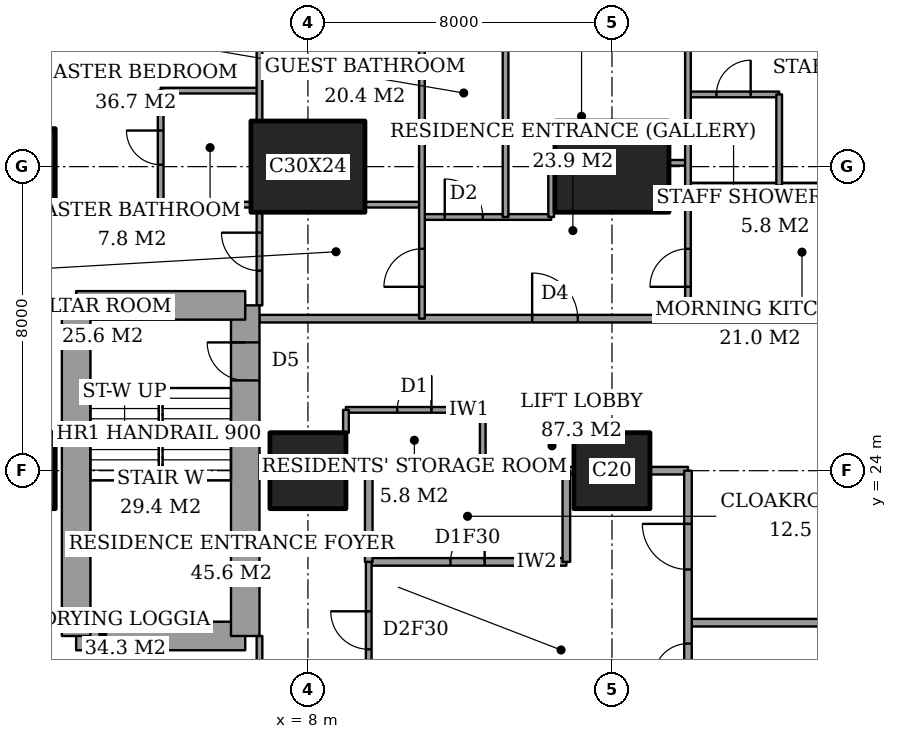
"""IFC4 building model, lengths in metres.
Left out: names, types, materials, properties, quantities, classifications, styles, units other than length and angle.
Written with IfcOpenShell. Run it as: python <this file> out.ifc"""

import sys

from ifc_helpers import new_model, si_unit, direction, frame, frame_2d, origin, origin_2d, place, context, subcontext, project, spatial, rectangle, extrude, element, fill, save


model = new_model("IFC4")
c1 = context("Model", 3, precision=1e-05, world=origin(), true_north=direction((0.0, 1.0)))
c2 = subcontext(c1, "Body", "Model", "MODEL_VIEW")
j1 = project(units=[si_unit("LENGTHUNIT", "METRE"), si_unit("PLANEANGLEUNIT", "RADIAN")], contexts=[c1])
p1 = place(None, origin())
s1 = spatial("IfcSite", under=j1, at=p1, CompositionType="ELEMENT")
p2 = place(p1, origin())
s2 = spatial("IfcBuilding", under=s1, at=p2, CompositionType="ELEMENT")
p3 = place(p2, frame((0.0, 0.0, 110.6)))
s3 = spatial("IfcBuildingStorey", under=s2, at=p3, CompositionType="ELEMENT", Elevation=110.6)
for number, where, z_axis, x_axis in (
    (1, (0.35, 24.0, 0.0), (0.0, 0.0, 1.0), (1.0, 0.0, 0.0)),
    (2, (0.35, 32.0, 0.0), (0.0, 0.0, 1.0), (1.0, 0.0, 0.0)),
    (3, (8.0, 24.0, 0.0), (0.0, 0.0, 1.0), (1.0, 0.0, 0.0)),
):
    element("IfcColumn", number, at=place(p3, frame(where, z_axis=z_axis, x_axis=x_axis)), inside=s3, PredefinedType="COLUMN", context=c2, shape_type="SweptSolid", body=[
        extrude(rectangle(XDim=2.0, YDim=2.0, at=origin_2d()), origin(), (0.0, 0.0, 1.0), 3.6),
    ])
p4 = place(p3, frame((8.0, 32.0, 0.0), z_axis=(0.0, 0.0, 1.0), x_axis=(1.0, 0.0, 0.0)))
e4 = element("IfcColumn", 4, at=p4, inside=s3, PredefinedType="COLUMN", context=c2, shape_type="SweptSolid", body=[
    extrude(rectangle(XDim=3.0, YDim=2.4, at=origin_2d()), origin(), (0.0, 0.0, 1.0), 3.6),
])
p5 = place(p3, frame((16.0, 24.0, 0.0), z_axis=(0.0, 0.0, 1.0), x_axis=(1.0, 0.0, 0.0)))
e5 = element("IfcColumn", 5, at=p5, inside=s3, PredefinedType="COLUMN", context=c2, shape_type="SweptSolid", body=[
    extrude(rectangle(XDim=2.0, YDim=2.0, at=origin_2d()), origin(), (0.0, 0.0, 1.0), 3.6),
])
p6 = place(p3, frame((16.0, 32.0, 0.0), z_axis=(0.0, 0.0, 1.0), x_axis=(1.0, 0.0, 0.0)))
e6 = element("IfcColumn", 6, at=p6, inside=s3, PredefinedType="COLUMN", context=c2, shape_type="SweptSolid", body=[
    extrude(rectangle(XDim=3.0, YDim=2.4, at=origin_2d()), origin(), (0.0, 0.0, 1.0), 3.6),
])
p7 = place(p3, frame((1.9, 19.65, 0.0), z_axis=(0.0, 0.0, 1.0), x_axis=(1.0, 0.0, 0.0)))
e7 = element("IfcWall", 7, at=p7, inside=s3, PredefinedType="SHEAR", context=c2, shape_type="SweptSolid", body=[
    extrude(rectangle(XDim=4.45, YDim=0.75, at=frame_2d((2.225, 0.0))), origin(), (0.0, 0.0, 1.0), 3.6),
])
p8 = place(p3, frame((6.35, 19.65, 0.0), z_axis=(0.0, 0.0, 1.0), x_axis=(0.0, 1.0, 0.0)))
e8 = element("IfcWall", 8, at=p8, inside=s3, PredefinedType="SHEAR", context=c2, shape_type="SweptSolid", body=[
    extrude(rectangle(XDim=8.7, YDim=0.75, at=frame_2d((4.35, 0.0))), origin(), (0.0, 0.0, 1.0), 3.6),
])
p9 = place(p8, frame((6.725, 0.0, 0.0)))
e9 = element("IfcOpeningElement", 9, at=p9, cuts=e8, PredefinedType="OPENING", context=c2, shape_type="SweptSolid", body=[
    extrude(rectangle(XDim=1.0, YDim=2.1, at=frame_2d((0.5, 1.05))), frame((0.0, 0.385, 0.0), z_axis=(0.0, -1.0, 0.0), x_axis=(1.0, 0.0, 0.0)), (0.0, 0.0, 1.0), 0.77),
])
p10 = place(p3, frame((6.35, 28.35, 0.0), z_axis=(0.0, 0.0, 1.0), x_axis=(-1.0, 0.0, 0.0)))
e10 = element("IfcWall", 10, at=p10, inside=s3, PredefinedType="SHEAR", context=c2, shape_type="SweptSolid", body=[
    extrude(rectangle(XDim=4.45, YDim=0.75, at=frame_2d((2.225, 0.0))), origin(), (0.0, 0.0, 1.0), 3.6),
])
p11 = place(p3, frame((1.9, 28.35, 0.0), z_axis=(0.0, 0.0, 1.0), x_axis=(0.0, -1.0, 0.0)))
e11 = element("IfcWall", 11, at=p11, inside=s3, PredefinedType="SHEAR", context=c2, shape_type="SweptSolid", body=[
    extrude(rectangle(XDim=8.7, YDim=0.75, at=frame_2d((4.35, 0.0))), origin(), (0.0, 0.0, 1.0), 3.6),
])
p12 = place(p3, frame((18.0, 20.0, 0.0), z_axis=(0.0, 0.0, 1.0), x_axis=(1.0, 0.0, 0.0)))
e12 = element("IfcWall", 12, at=p12, inside=s3, PredefinedType="PARTITIONING", context=c2, shape_type="SweptSolid", body=[
    extrude(rectangle(XDim=6.0, YDim=0.2, at=frame_2d((3.0, 0.0))), origin(), (0.0, 0.0, 1.0), 3.35),
])
p13 = place(p3, frame((9.6, 21.6, 0.0), z_axis=(0.0, 0.0, 1.0), x_axis=(1.0, 0.0, 0.0)))
e13 = element("IfcWall", 13, at=p13, inside=s3, PredefinedType="PARTITIONING", context=c2, shape_type="SweptSolid", body=[
    extrude(rectangle(XDim=5.2, YDim=0.2, at=frame_2d((2.6, 0.0))), origin(), (0.0, 0.0, 1.0), 3.35),
])
p14 = place(p13, frame((2.15, 0.0, 0.0)))
e14 = element("IfcOpeningElement", 14, at=p14, cuts=e13, PredefinedType="OPENING", context=c2, shape_type="SweptSolid", body=[
    extrude(rectangle(XDim=0.9, YDim=2.1, at=frame_2d((0.45, 1.05))), frame((0.0, 0.11, 0.0), z_axis=(0.0, -1.0, 0.0), x_axis=(1.0, 0.0, 0.0)), (0.0, 0.0, 1.0), 0.22),
])
p15 = place(p3, frame((9.0, 24.0, 0.0), z_axis=(0.0, 0.0, 1.0), x_axis=(1.0, 0.0, 0.0)))
e15 = element("IfcWall", 15, at=p15, inside=s3, PredefinedType="PARTITIONING", context=c2, shape_type="SweptSolid", body=[
    extrude(rectangle(XDim=6.0, YDim=0.2, at=frame_2d((3.0, 0.0))), origin(), (0.0, 0.0, 1.0), 3.35),
])
p16 = place(p3, frame((17.0, 24.0, 0.0), z_axis=(0.0, 0.0, 1.0), x_axis=(1.0, 0.0, 0.0)))
e16 = element("IfcWall", 16, at=p16, inside=s3, PredefinedType="PARTITIONING", context=c2, shape_type="SweptSolid", body=[
    extrude(rectangle(XDim=1.0, YDim=0.2, at=frame_2d((0.5, 0.0))), origin(), (0.0, 0.0, 1.0), 3.35),
])
p17 = place(p3, frame((9.0, 25.6, 0.0), z_axis=(0.0, 0.0, 1.0), x_axis=(1.0, 0.0, 0.0)))
e17 = element("IfcWall", 17, at=p17, inside=s3, PredefinedType="PARTITIONING", context=c2, shape_type="SweptSolid", body=[
    extrude(rectangle(XDim=3.6, YDim=0.15, at=frame_2d((1.8, 0.0))), origin(), (0.0, 0.0, 1.0), 3.35),
])
p18 = place(p17, frame((1.35, 0.0, 0.0)))
e18 = element("IfcOpeningElement", 18, at=p18, cuts=e17, PredefinedType="OPENING", context=c2, shape_type="SweptSolid", body=[
    extrude(rectangle(XDim=0.9, YDim=2.1, at=frame_2d((0.45, 1.05))), frame((0.0, 0.085, 0.0), z_axis=(0.0, -1.0, 0.0), x_axis=(1.0, 0.0, 0.0)), (0.0, 0.0, 1.0), 0.17),
])
p19 = place(p3, frame((6.725, 28.0, 0.0), z_axis=(0.0, 0.0, 1.0), x_axis=(1.0, 0.0, 0.0)))
e19 = element("IfcWall", 19, at=p19, inside=s3, PredefinedType="PARTITIONING", context=c2, shape_type="SweptSolid", body=[
    extrude(rectangle(XDim=17.275, YDim=0.2, at=frame_2d((8.637, 0.0))), origin(), (0.0, 0.0, 1.0), 3.35),
])
p20 = place(p19, frame((7.175, 0.0, 0.0)))
e20 = element("IfcOpeningElement", 20, at=p20, cuts=e19, PredefinedType="OPENING", context=c2, shape_type="SweptSolid", body=[
    extrude(rectangle(XDim=1.2, YDim=2.4, at=frame_2d((0.6, 1.2))), frame((0.0, 0.11, 0.0), z_axis=(0.0, -1.0, 0.0), x_axis=(1.0, 0.0, 0.0)), (0.0, 0.0, 1.0), 0.22),
])
p21 = place(p3, frame((11.0, 30.675, 0.0), z_axis=(0.0, 0.0, 1.0), x_axis=(1.0, 0.0, 0.0)))
e21 = element("IfcWall", 21, at=p21, inside=s3, PredefinedType="PARTITIONING", context=c2, shape_type="SweptSolid", body=[
    extrude(rectangle(XDim=3.4, YDim=0.15, at=frame_2d((1.7, 0.0))), origin(), (0.0, 0.0, 1.0), 3.35),
])
p22 = place(p21, frame((0.6, 0.0, 0.0)))
e22 = element("IfcOpeningElement", 22, at=p22, cuts=e21, PredefinedType="OPENING", context=c2, shape_type="SweptSolid", body=[
    extrude(rectangle(XDim=1.0, YDim=2.1, at=frame_2d((0.5, 1.05))), frame((0.0, 0.085, 0.0), z_axis=(0.0, -1.0, 0.0), x_axis=(1.0, 0.0, 0.0)), (0.0, 0.0, 1.0), 0.17),
])
p23 = place(p3, frame((1.35, 31.0, 0.0), z_axis=(0.0, 0.0, 1.0), x_axis=(1.0, 0.0, 0.0)))
e23 = element("IfcWall", 23, at=p23, inside=s3, PredefinedType="PARTITIONING", context=c2, shape_type="SweptSolid", body=[
    extrude(rectangle(XDim=5.15, YDim=0.15, at=frame_2d((2.575, 0.0))), origin(), (0.0, 0.0, 1.0), 3.35),
])
p24 = place(p3, frame((9.5, 31.0, 0.0), z_axis=(0.0, 0.0, 1.0), x_axis=(1.0, 0.0, 0.0)))
e24 = element("IfcWall", 24, at=p24, inside=s3, PredefinedType="PARTITIONING", context=c2, shape_type="SweptSolid", body=[
    extrude(rectangle(XDim=1.5, YDim=0.15, at=frame_2d((0.75, 0.0))), origin(), (0.0, 0.0, 1.0), 3.35),
])
p25 = place(p3, frame((18.0, 31.5, 0.0), z_axis=(0.0, 0.0, 1.0), x_axis=(1.0, 0.0, 0.0)))
e25 = element("IfcWall", 25, at=p25, inside=s3, PredefinedType="PARTITIONING", context=c2, shape_type="SweptSolid", body=[
    extrude(rectangle(XDim=6.0, YDim=0.15, at=frame_2d((3.0, 0.0))), origin(), (0.0, 0.0, 1.0), 3.35),
])
p26 = place(p3, frame((17.5, 32.1, 0.0), z_axis=(0.0, 0.0, 1.0), x_axis=(1.0, 0.0, 0.0)))
e26 = element("IfcWall", 26, at=p26, inside=s3, PredefinedType="PARTITIONING", context=c2, shape_type="SweptSolid", body=[
    extrude(rectangle(XDim=0.5, YDim=0.15, at=frame_2d((0.25, 0.0))), origin(), (0.0, 0.0, 1.0), 2.634),
])
p27 = place(p3, frame((18.0, 33.9, 0.0), z_axis=(0.0, 0.0, 1.0), x_axis=(1.0, 0.0, 0.0)))
e27 = element("IfcWall", 27, at=p27, inside=s3, PredefinedType="PARTITIONING", context=c2, shape_type="SweptSolid", body=[
    extrude(rectangle(XDim=2.4, YDim=0.15, at=frame_2d((1.2, 0.0))), origin(), (0.0, 0.0, 1.0), 3.35),
])
p28 = place(p27, frame((0.75, 0.0, 0.0)))
e28 = element("IfcOpeningElement", 28, at=p28, cuts=e27, PredefinedType="OPENING", context=c2, shape_type="SweptSolid", body=[
    extrude(rectangle(XDim=0.9, YDim=2.1, at=frame_2d((0.45, 1.05))), frame((0.0, 0.085, 0.0), z_axis=(0.0, -1.0, 0.0), x_axis=(1.0, 0.0, 0.0)), (0.0, 0.0, 1.0), 0.17),
])
p29 = place(p3, frame((4.125, 34.0, 0.0), z_axis=(0.0, 0.0, 1.0), x_axis=(1.0, 0.0, 0.0)))
e29 = element("IfcWall", 29, at=p29, inside=s3, PredefinedType="PARTITIONING", context=c2, shape_type="SweptSolid", body=[
    extrude(rectangle(XDim=2.6, YDim=0.15, at=frame_2d((1.3, 0.0))), origin(), (0.0, 0.0, 1.0), 3.35),
])
p30 = place(p3, frame((4.125, 31.0, 0.0), z_axis=(0.0, 0.0, 1.0), x_axis=(0.0, 1.0, 0.0)))
e30 = element("IfcWall", 30, at=p30, inside=s3, PredefinedType="PARTITIONING", context=c2, shape_type="SweptSolid", body=[
    extrude(rectangle(XDim=3.0, YDim=0.15, at=frame_2d((1.5, 0.0))), origin(), (0.0, 0.0, 1.0), 3.35),
])
p31 = place(p30, frame((1.05, 0.0, 0.0)))
e31 = element("IfcOpeningElement", 31, at=p31, cuts=e30, PredefinedType="OPENING", context=c2, shape_type="SweptSolid", body=[
    extrude(rectangle(XDim=0.9, YDim=2.1, at=frame_2d((0.45, 1.05))), frame((0.0, 0.085, 0.0), z_axis=(0.0, -1.0, 0.0), x_axis=(1.0, 0.0, 0.0)), (0.0, 0.0, 1.0), 0.17),
])
p32 = place(p3, frame((6.725, 17.2, 0.0), z_axis=(0.0, 0.0, 1.0), x_axis=(0.0, 1.0, 0.0)))
e32 = element("IfcWall", 32, at=p32, inside=s3, PredefinedType="PARTITIONING", context=c2, shape_type="SweptSolid", body=[
    extrude(rectangle(XDim=2.45, YDim=0.15, at=frame_2d((1.225, 0.0))), origin(), (0.0, 0.0, 1.0), 3.35),
])
p33 = place(p32, frame((0.587, 0.0, 0.0)))
e33 = element("IfcOpeningElement", 33, at=p33, cuts=e32, PredefinedType="OPENING", context=c2, shape_type="SweptSolid", body=[
    extrude(rectangle(XDim=0.9, YDim=2.1, at=frame_2d((0.45, 1.05))), frame((0.0, 0.085, 0.0), z_axis=(0.0, -1.0, 0.0), x_axis=(1.0, 0.0, 0.0)), (0.0, 0.0, 1.0), 0.17),
])
p34 = place(p3, frame((6.725, 28.35, 0.0), z_axis=(0.0, 0.0, 1.0), x_axis=(0.0, 1.0, 0.0)))
e34 = element("IfcWall", 34, at=p34, inside=s3, PredefinedType="PARTITIONING", context=c2, shape_type="SweptSolid", body=[
    extrude(rectangle(XDim=2.45, YDim=0.15, at=frame_2d((1.225, 0.0))), origin(), (0.0, 0.0, 1.0), 3.35),
])
p35 = place(p34, frame((0.913, 0.0, 0.0)))
e35 = element("IfcOpeningElement", 35, at=p35, cuts=e34, PredefinedType="OPENING", context=c2, shape_type="SweptSolid", body=[
    extrude(rectangle(XDim=1.0, YDim=2.1, at=frame_2d((0.5, 1.05))), frame((0.0, 0.085, 0.0), z_axis=(0.0, -1.0, 0.0), x_axis=(1.0, 0.0, 0.0)), (0.0, 0.0, 1.0), 0.17),
])
p36 = place(p3, frame((6.725, 33.2, 0.0), z_axis=(0.0, 0.0, 1.0), x_axis=(0.0, 1.0, 0.0)))
e36 = element("IfcWall", 36, at=p36, inside=s3, PredefinedType="PARTITIONING", context=c2, shape_type="SweptSolid", body=[
    extrude(rectangle(XDim=4.0, YDim=0.15, at=frame_2d((2.0, 0.0))), origin(), (0.0, 0.0, 1.0), 3.35),
])
p37 = place(p3, frame((9.0, 25.0, 0.0), z_axis=(0.0, 0.0, 1.0), x_axis=(0.0, 1.0, 0.0)))
e37 = element("IfcWall", 37, at=p37, inside=s3, PredefinedType="PARTITIONING", context=c2, shape_type="SweptSolid", body=[
    extrude(rectangle(XDim=0.6, YDim=0.15, at=frame_2d((0.3, 0.0))), origin(), (0.0, 0.0, 1.0), 3.35),
])
p38 = place(p3, frame((9.6, 21.6, 0.0), z_axis=(0.0, 0.0, 1.0), x_axis=(0.0, 1.0, 0.0)))
e38 = element("IfcWall", 38, at=p38, inside=s3, PredefinedType="PARTITIONING", context=c2, shape_type="SweptSolid", body=[
    extrude(rectangle(XDim=2.4, YDim=0.2, at=frame_2d((1.2, 0.0))), origin(), (0.0, 0.0, 1.0), 3.35),
])
p39 = place(p3, frame((9.6, 10.6, 0.0), z_axis=(0.0, 0.0, 1.0), x_axis=(0.0, 1.0, 0.0)))
e39 = element("IfcWall", 39, at=p39, inside=s3, PredefinedType="PARTITIONING", context=c2, shape_type="SweptSolid", body=[
    extrude(rectangle(XDim=11.0, YDim=0.15, at=frame_2d((5.5, 0.0))), origin(), (0.0, 0.0, 1.0), 3.35),
])
p40 = place(p39, frame((8.7, 0.0, 0.0)))
e40 = element("IfcOpeningElement", 40, at=p40, cuts=e39, PredefinedType="OPENING", context=c2, shape_type="SweptSolid", body=[
    extrude(rectangle(XDim=1.0, YDim=2.1, at=frame_2d((0.5, 1.05))), frame((0.0, 0.085, 0.0), z_axis=(0.0, -1.0, 0.0), x_axis=(1.0, 0.0, 0.0)), (0.0, 0.0, 1.0), 0.17),
])
p41 = place(p3, frame((11.0, 28.0, 0.0), z_axis=(0.0, 0.0, 1.0), x_axis=(0.0, 1.0, 0.0)))
e41 = element("IfcWall", 41, at=p41, inside=s3, PredefinedType="PARTITIONING", context=c2, shape_type="SweptSolid", body=[
    extrude(rectangle(XDim=9.2, YDim=0.15, at=frame_2d((4.6, 0.0))), origin(), (0.0, 0.0, 1.0), 3.35),
])
p42 = place(p41, frame((0.837, 0.0, 0.0)))
e42 = element("IfcOpeningElement", 42, at=p42, cuts=e41, PredefinedType="OPENING", context=c2, shape_type="SweptSolid", body=[
    extrude(rectangle(XDim=1.0, YDim=2.1, at=frame_2d((0.5, 1.05))), frame((0.0, 0.085, 0.0), z_axis=(0.0, -1.0, 0.0), x_axis=(1.0, 0.0, 0.0)), (0.0, 0.0, 1.0), 0.17),
])
p43 = place(p3, frame((12.6, 24.0, 0.0), z_axis=(0.0, 0.0, 1.0), x_axis=(0.0, 1.0, 0.0)))
e43 = element("IfcWall", 43, at=p43, inside=s3, PredefinedType="PARTITIONING", context=c2, shape_type="SweptSolid", body=[
    extrude(rectangle(XDim=1.6, YDim=0.15, at=frame_2d((0.8, 0.0))), origin(), (0.0, 0.0, 1.0), 3.35),
])
p44 = place(p3, frame((13.2, 30.675, 0.0), z_axis=(0.0, 0.0, 1.0), x_axis=(0.0, 1.0, 0.0)))
e44 = element("IfcWall", 44, at=p44, inside=s3, PredefinedType="PARTITIONING", context=c2, shape_type="SweptSolid", body=[
    extrude(rectangle(XDim=6.525, YDim=0.15, at=frame_2d((3.262, 0.0))), origin(), (0.0, 0.0, 1.0), 3.35),
])
p45 = place(p3, frame((14.4, 30.675, 0.0), z_axis=(0.0, 0.0, 1.0), x_axis=(0.0, 1.0, 0.0)))
e45 = element("IfcWall", 45, at=p45, inside=s3, PredefinedType="PARTITIONING", context=c2, shape_type="SweptSolid", body=[
    extrude(rectangle(XDim=1.425, YDim=0.15, at=frame_2d((0.712, 0.0))), origin(), (0.0, 0.0, 1.0), 3.35),
])
p46 = place(p3, frame((14.8, 21.6, 0.0), z_axis=(0.0, 0.0, 1.0), x_axis=(0.0, 1.0, 0.0)))
e46 = element("IfcWall", 46, at=p46, inside=s3, PredefinedType="PARTITIONING", context=c2, shape_type="SweptSolid", body=[
    extrude(rectangle(XDim=2.4, YDim=0.2, at=frame_2d((1.2, 0.0))), origin(), (0.0, 0.0, 1.0), 3.35),
])
p47 = place(p3, frame((18.0, 18.0, 0.0), z_axis=(0.0, 0.0, 1.0), x_axis=(0.0, 1.0, 0.0)))
e47 = element("IfcWall", 47, at=p47, inside=s3, PredefinedType="PARTITIONING", context=c2, shape_type="SweptSolid", body=[
    extrude(rectangle(XDim=6.0, YDim=0.2, at=frame_2d((3.0, 0.0))), origin(), (0.0, 0.0, 1.0), 3.35),
])
p48 = place(p47, frame((3.4, 0.0, 0.0)))
e48 = element("IfcOpeningElement", 48, at=p48, cuts=e47, PredefinedType="OPENING", context=c2, shape_type="SweptSolid", body=[
    extrude(rectangle(XDim=1.2, YDim=2.4, at=frame_2d((0.6, 1.2))), frame((0.0, 0.11, 0.0), z_axis=(0.0, -1.0, 0.0), x_axis=(1.0, 0.0, 0.0)), (0.0, 0.0, 1.0), 0.22),
])
p49 = place(p47, frame((0.55, 0.0, 0.0)))
e49 = element("IfcOpeningElement", 49, at=p49, cuts=e47, PredefinedType="OPENING", context=c2, shape_type="SweptSolid", body=[
    extrude(rectangle(XDim=0.9, YDim=2.1, at=frame_2d((0.45, 1.05))), frame((0.0, 0.11, 0.0), z_axis=(0.0, -1.0, 0.0), x_axis=(1.0, 0.0, 0.0)), (0.0, 0.0, 1.0), 0.22),
])
p50 = place(p3, frame((18.0, 28.0, 0.0), z_axis=(0.0, 0.0, 1.0), x_axis=(0.0, 1.0, 0.0)))
e50 = element("IfcWall", 50, at=p50, inside=s3, PredefinedType="PARTITIONING", context=c2, shape_type="SweptSolid", body=[
    extrude(rectangle(XDim=9.2, YDim=0.15, at=frame_2d((4.6, 0.0))), origin(), (0.0, 0.0, 1.0), 3.35),
])
p51 = place(p50, frame((0.837, 0.0, 0.0)))
e51 = element("IfcOpeningElement", 51, at=p51, cuts=e50, PredefinedType="OPENING", context=c2, shape_type="SweptSolid", body=[
    extrude(rectangle(XDim=1.0, YDim=2.1, at=frame_2d((0.5, 1.05))), frame((0.0, 0.085, 0.0), z_axis=(0.0, -1.0, 0.0), x_axis=(1.0, 0.0, 0.0)), (0.0, 0.0, 1.0), 0.17),
])
p52 = place(p3, frame((20.4, 31.5, 0.0), z_axis=(0.0, 0.0, 1.0), x_axis=(0.0, 1.0, 0.0)))
e52 = element("IfcWall", 52, at=p52, inside=s3, PredefinedType="PARTITIONING", context=c2, shape_type="SweptSolid", body=[
    extrude(rectangle(XDim=2.4, YDim=0.15, at=frame_2d((1.2, 0.0))), origin(), (0.0, 0.0, 1.0), 3.35),
])
p53 = place(p40, origin())
e53 = element("IfcDoor", 53, at=p53, inside=s3, OperationType="SINGLE_SWING_LEFT", PredefinedType="DOOR", context=c2, shape_type="SweptSolid", body=[
    extrude(rectangle(XDim=1.0, YDim=2.1, at=frame_2d((0.5, 1.05))), frame((0.0, 0.025, 0.0), z_axis=(0.0, -1.0, 0.0), x_axis=(1.0, 0.0, 0.0)), (0.0, 0.0, 1.0), 0.05),
])
fill(e40, e53)
p54 = place(p14, origin())
e54 = element("IfcDoor", 54, at=p54, inside=s3, OperationType="SINGLE_SWING_LEFT", PredefinedType="DOOR", context=c2, shape_type="SweptSolid", body=[
    extrude(rectangle(XDim=0.9, YDim=2.1, at=frame_2d((0.45, 1.05))), frame((0.0, 0.025, 0.0), z_axis=(0.0, -1.0, 0.0), x_axis=(1.0, 0.0, 0.0)), (0.0, 0.0, 1.0), 0.05),
])
fill(e14, e54)
p55 = place(p48, origin())
e55 = element("IfcDoor", 55, at=p55, inside=s3, OperationType="SINGLE_SWING_LEFT", PredefinedType="DOOR", context=c2, shape_type="SweptSolid", body=[
    extrude(rectangle(XDim=1.2, YDim=2.4, at=frame_2d((0.6, 1.2))), frame((0.0, 0.025, 0.0), z_axis=(0.0, -1.0, 0.0), x_axis=(1.0, 0.0, 0.0)), (0.0, 0.0, 1.0), 0.05),
])
fill(e48, e55)
p56 = place(p49, origin())
e56 = element("IfcDoor", 56, at=p56, inside=s3, OperationType="SINGLE_SWING_RIGHT", PredefinedType="DOOR", context=c2, shape_type="SweptSolid", body=[
    extrude(rectangle(XDim=0.9, YDim=2.1, at=frame_2d((0.45, 1.05))), frame((0.0, 0.025, 0.0), z_axis=(0.0, -1.0, 0.0), x_axis=(1.0, 0.0, 0.0)), (0.0, 0.0, 1.0), 0.05),
])
fill(e49, e56)
p57 = place(p31, origin())
e57 = element("IfcDoor", 57, at=p57, inside=s3, OperationType="SINGLE_SWING_LEFT", PredefinedType="DOOR", context=c2, shape_type="SweptSolid", body=[
    extrude(rectangle(XDim=0.9, YDim=2.1, at=frame_2d((0.45, 1.05))), frame((0.0, 0.025, 0.0), z_axis=(0.0, -1.0, 0.0), x_axis=(1.0, 0.0, 0.0)), (0.0, 0.0, 1.0), 0.05),
])
fill(e31, e57)
p58 = place(p35, origin())
e58 = element("IfcDoor", 58, at=p58, inside=s3, OperationType="SINGLE_SWING_LEFT", PredefinedType="DOOR", context=c2, shape_type="SweptSolid", body=[
    extrude(rectangle(XDim=1.0, YDim=2.1, at=frame_2d((0.5, 1.05))), frame((0.0, 0.025, 0.0), z_axis=(0.0, -1.0, 0.0), x_axis=(1.0, 0.0, 0.0)), (0.0, 0.0, 1.0), 0.05),
])
fill(e35, e58)
p59 = place(p42, origin())
e59 = element("IfcDoor", 59, at=p59, inside=s3, OperationType="SINGLE_SWING_RIGHT", PredefinedType="DOOR", context=c2, shape_type="SweptSolid", body=[
    extrude(rectangle(XDim=1.0, YDim=2.1, at=frame_2d((0.5, 1.05))), frame((0.0, 0.025, 0.0), z_axis=(0.0, -1.0, 0.0), x_axis=(1.0, 0.0, 0.0)), (0.0, 0.0, 1.0), 0.05),
])
fill(e42, e59)
p60 = place(p20, origin())
e60 = element("IfcDoor", 60, at=p60, inside=s3, OperationType="SINGLE_SWING_RIGHT", PredefinedType="DOOR", context=c2, shape_type="SweptSolid", body=[
    extrude(rectangle(XDim=1.2, YDim=2.4, at=frame_2d((0.6, 1.2))), frame((0.0, 0.025, 0.0), z_axis=(0.0, -1.0, 0.0), x_axis=(1.0, 0.0, 0.0)), (0.0, 0.0, 1.0), 0.05),
])
fill(e20, e60)
p61 = place(p22, origin())
e61 = element("IfcDoor", 61, at=p61, inside=s3, OperationType="SINGLE_SWING_RIGHT", PredefinedType="DOOR", context=c2, shape_type="SweptSolid", body=[
    extrude(rectangle(XDim=1.0, YDim=2.1, at=frame_2d((0.5, 1.05))), frame((0.0, 0.025, 0.0), z_axis=(0.0, -1.0, 0.0), x_axis=(1.0, 0.0, 0.0)), (0.0, 0.0, 1.0), 0.05),
])
fill(e22, e61)
p62 = place(p28, origin())
e62 = element("IfcDoor", 62, at=p62, inside=s3, OperationType="SINGLE_SWING_LEFT", PredefinedType="DOOR", context=c2, shape_type="SweptSolid", body=[
    extrude(rectangle(XDim=0.9, YDim=2.1, at=frame_2d((0.45, 1.05))), frame((0.0, 0.025, 0.0), z_axis=(0.0, -1.0, 0.0), x_axis=(1.0, 0.0, 0.0)), (0.0, 0.0, 1.0), 0.05),
])
fill(e28, e62)
p63 = place(p51, origin())
e63 = element("IfcDoor", 63, at=p63, inside=s3, OperationType="SINGLE_SWING_RIGHT", PredefinedType="DOOR", context=c2, shape_type="SweptSolid", body=[
    extrude(rectangle(XDim=1.0, YDim=2.1, at=frame_2d((0.5, 1.05))), frame((0.0, 0.025, 0.0), z_axis=(0.0, -1.0, 0.0), x_axis=(1.0, 0.0, 0.0)), (0.0, 0.0, 1.0), 0.05),
])
fill(e51, e63)
p64 = place(p18, origin())
e64 = element("IfcDoor", 64, at=p64, inside=s3, OperationType="SINGLE_SWING_LEFT", PredefinedType="DOOR", context=c2, shape_type="SweptSolid", body=[
    extrude(rectangle(XDim=0.9, YDim=2.1, at=frame_2d((0.45, 1.05))), frame((0.0, 0.025, 0.0), z_axis=(0.0, -1.0, 0.0), x_axis=(1.0, 0.0, 0.0)), (0.0, 0.0, 1.0), 0.05),
])
fill(e18, e64)
p65 = place(p9, origin())
e65 = element("IfcDoor", 65, at=p65, inside=s3, OperationType="SINGLE_SWING_LEFT", PredefinedType="DOOR", context=c2, shape_type="SweptSolid", body=[
    extrude(rectangle(XDim=1.0, YDim=2.1, at=frame_2d((0.5, 1.05))), frame((0.0, 0.025, 0.0), z_axis=(0.0, -1.0, 0.0), x_axis=(1.0, 0.0, 0.0)), (0.0, 0.0, 1.0), 0.05),
])
fill(e9, e65)
save(model, sys.argv[1])
